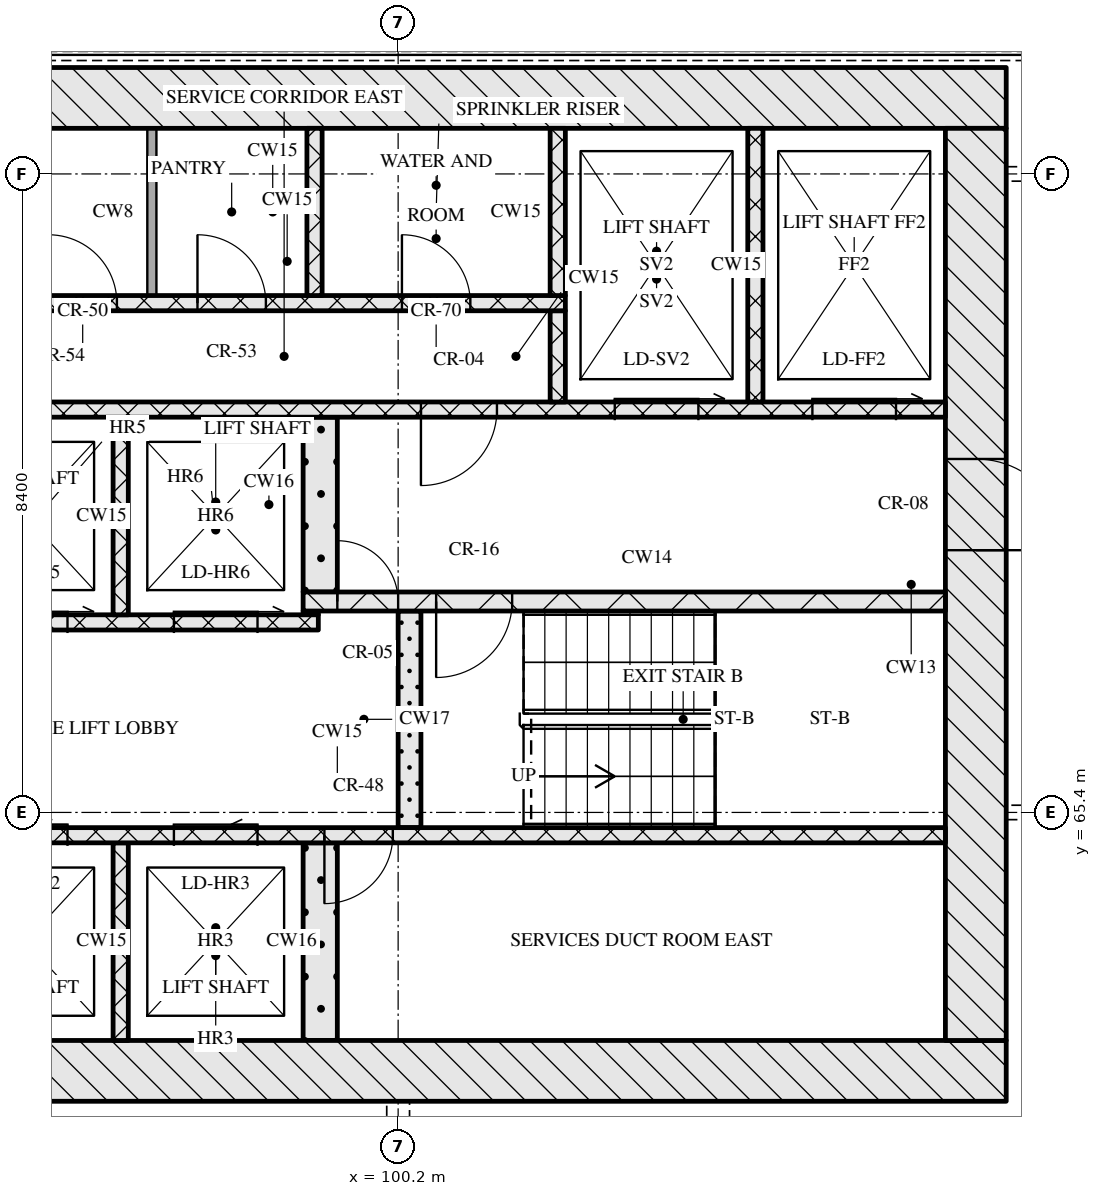
"""IFC4 building model, lengths in metres.
Left out: names, types, materials, properties, quantities, classifications, styles, units other than length and angle.
Written with IfcOpenShell. Run it as: python <this file> out.ifc"""

import sys

from ifc_helpers import new_model, si_unit, direction, frame, frame_2d, origin, place, context, subcontext, project, spatial, rectangle, extrude, element, fill, save


model = new_model("IFC4")
c1 = context("Model", 3, precision=1e-05, world=origin(), true_north=direction((0.0, 1.0)))
c2 = subcontext(c1, "Body", "Model", "MODEL_VIEW")
j1 = project(units=[si_unit("LENGTHUNIT", "METRE"), si_unit("PLANEANGLEUNIT", "RADIAN")], contexts=[c1])
p1 = place(None, origin())
s1 = spatial("IfcSite", under=j1, at=p1, CompositionType="ELEMENT")
p2 = place(p1, origin())
s2 = spatial("IfcBuilding", under=s1, at=p2, CompositionType="ELEMENT")
p3 = place(p2, frame((0.0, 0.0, 176.25)))
s3 = spatial("IfcBuildingStorey", under=s2, at=p3, CompositionType="ELEMENT", Elevation=176.25)
p4 = place(p3, frame((67.0, 62.0, 0.0), z_axis=(0.0, 0.0, 1.0), x_axis=(1.0, 0.0, 0.0)))
e1 = element("IfcWall", 1, at=p4, inside=s3, PredefinedType="SOLIDWALL", context=c2, shape_type="SweptSolid", body=[
    extrude(rectangle(XDim=41.2, YDim=0.8, at=frame_2d((20.6, 0.0))), origin(), (0.0, 0.0, 1.0), 3.32),
])
p5 = place(p4, frame((20.95, 0.0, 0.0)))
e2 = element("IfcOpeningElement", 2, at=p5, cuts=e1, PredefinedType="OPENING", context=c2, shape_type="SweptSolid", body=[
    extrude(rectangle(XDim=1.8, YDim=2.1, at=frame_2d((0.9, 1.05))), frame((0.0, 0.41, 0.0), z_axis=(0.0, -1.0, 0.0), x_axis=(1.0, 0.0, 0.0)), (0.0, 0.0, 1.0), 0.82),
])
p6 = place(p3, frame((67.0, 74.8, 0.0), z_axis=(0.0, 0.0, 1.0), x_axis=(1.0, 0.0, 0.0)))
e3 = element("IfcWall", 3, at=p6, inside=s3, PredefinedType="SOLIDWALL", context=c2, shape_type="SweptSolid", body=[
    extrude(rectangle(XDim=41.2, YDim=0.8, at=frame_2d((20.6, 0.0))), origin(), (0.0, 0.0, 1.0), 3.32),
])
p7 = place(p3, frame((107.8, 62.4, 0.0), z_axis=(0.0, 0.0, 1.0), x_axis=(0.0, 1.0, 0.0)))
e4 = element("IfcWall", 4, at=p7, inside=s3, PredefinedType="SOLIDWALL", context=c2, shape_type="SweptSolid", body=[
    extrude(rectangle(XDim=12.0, YDim=0.8, at=frame_2d((6.0, 0.0))), origin(), (0.0, 0.0, 1.0), 3.32),
])
p8 = place(p7, frame((6.45, 0.0, 0.0)))
e5 = element("IfcOpeningElement", 5, at=p8, cuts=e4, PredefinedType="OPENING", context=c2, shape_type="SweptSolid", body=[
    extrude(rectangle(XDim=1.2, YDim=2.1, at=frame_2d((0.6, 1.05))), frame((0.0, 0.41, 0.0), z_axis=(0.0, -1.0, 0.0), x_axis=(1.0, 0.0, 0.0)), (0.0, 0.0, 1.0), 0.82),
])
p9 = place(p3, frame((96.55, 62.4, 0.0), z_axis=(0.0, 0.0, 1.0), x_axis=(0.0, 1.0, 0.0)))
e6 = element("IfcWall", 6, at=p9, inside=s3, PredefinedType="SOLIDWALL", context=c2, shape_type="SweptSolid", body=[
    extrude(rectangle(XDim=2.6, YDim=0.2, at=frame_2d((1.3, 0.0))), origin(), (0.0, 0.0, 1.0), 3.32),
])
p10 = place(p3, frame((99.175, 62.4, 0.0), z_axis=(0.0, 0.0, 1.0), x_axis=(0.0, 1.0, 0.0)))
e7 = element("IfcWall", 7, at=p10, inside=s3, PredefinedType="SOLIDWALL", context=c2, shape_type="SweptSolid", body=[
    extrude(rectangle(XDim=2.6, YDim=0.45, at=frame_2d((1.3, 0.0))), origin(), (0.0, 0.0, 1.0), 3.32),
])
p11 = place(p3, frame((91.4, 65.1, 0.0), z_axis=(0.0, 0.0, 1.0), x_axis=(1.0, 0.0, 0.0)))
e8 = element("IfcWall", 8, at=p11, inside=s3, PredefinedType="SOLIDWALL", context=c2, shape_type="SweptSolid", body=[
    extrude(rectangle(XDim=16.0, YDim=0.2, at=frame_2d((8.0, 0.0))), origin(), (0.0, 0.0, 1.0), 3.32),
])
p12 = place(p11, frame((0.85, 0.0, 0.0)))
e9 = element("IfcOpeningElement", 9, at=p12, cuts=e8, PredefinedType="OPENING", context=c2, shape_type="SweptSolid", body=[
    extrude(rectangle(XDim=1.1, YDim=2.1, at=frame_2d((0.55, 1.05))), frame((0.0, 0.11, 0.0), z_axis=(0.0, -1.0, 0.0), x_axis=(1.0, 0.0, 0.0)), (0.0, 0.0, 1.0), 0.22),
])
p13 = place(p11, frame((3.35, 0.0, 0.0)))
e10 = element("IfcOpeningElement", 10, at=p13, cuts=e8, PredefinedType="OPENING", context=c2, shape_type="SweptSolid", body=[
    extrude(rectangle(XDim=1.1, YDim=2.1, at=frame_2d((0.55, 1.05))), frame((0.0, 0.11, 0.0), z_axis=(0.0, -1.0, 0.0), x_axis=(1.0, 0.0, 0.0)), (0.0, 0.0, 1.0), 0.22),
])
p14 = place(p11, frame((5.85, 0.0, 0.0)))
e11 = element("IfcOpeningElement", 11, at=p14, cuts=e8, PredefinedType="OPENING", context=c2, shape_type="SweptSolid", body=[
    extrude(rectangle(XDim=1.1, YDim=2.1, at=frame_2d((0.55, 1.05))), frame((0.0, 0.11, 0.0), z_axis=(0.0, -1.0, 0.0), x_axis=(1.0, 0.0, 0.0)), (0.0, 0.0, 1.0), 0.22),
])
p15 = place(p11, frame((7.83, 0.0, 0.0)))
e12 = element("IfcOpeningElement", 12, at=p15, cuts=e8, PredefinedType="OPENING", context=c2, shape_type="SweptSolid", body=[
    extrude(rectangle(XDim=0.9, YDim=2.1, at=frame_2d((0.45, 1.05))), frame((0.0, 0.11, 0.0), z_axis=(0.0, -1.0, 0.0), x_axis=(1.0, 0.0, 0.0)), (0.0, 0.0, 1.0), 0.22),
])
p16 = place(p3, frame((100.35, 65.2, 0.0), z_axis=(0.0, 0.0, 1.0), x_axis=(0.0, 1.0, 0.0)))
e13 = element("IfcWall", 13, at=p16, inside=s3, PredefinedType="SOLIDWALL", context=c2, shape_type="SweptSolid", body=[
    extrude(rectangle(XDim=2.85, YDim=0.3, at=frame_2d((1.425, 0.0))), origin(), (0.0, 0.0, 1.0), 3.32),
])
p17 = place(p3, frame((76.05, 67.9, 0.0), z_axis=(0.0, 0.0, 1.0), x_axis=(1.0, 0.0, 0.0)))
e14 = element("IfcWall", 14, at=p17, inside=s3, PredefinedType="SOLIDWALL", context=c2, shape_type="SweptSolid", body=[
    extrude(rectangle(XDim=23.1, YDim=0.2, at=frame_2d((11.55, 0.0))), origin(), (0.0, 0.0, 1.0), 3.32),
])
p18 = place(p17, frame((1.35, 0.0, 0.0)))
e15 = element("IfcOpeningElement", 15, at=p18, cuts=e14, PredefinedType="OPENING", context=c2, shape_type="SweptSolid", body=[
    extrude(rectangle(XDim=0.9, YDim=2.1, at=frame_2d((0.45, 1.05))), frame((0.0, 0.11, 0.0), z_axis=(0.0, -1.0, 0.0), x_axis=(1.0, 0.0, 0.0)), (0.0, 0.0, 1.0), 0.22),
])
p19 = place(p17, frame((5.06, 0.0, 0.0)))
e16 = element("IfcOpeningElement", 16, at=p19, cuts=e14, PredefinedType="OPENING", context=c2, shape_type="SweptSolid", body=[
    extrude(rectangle(XDim=0.9, YDim=2.1, at=frame_2d((0.45, 1.05))), frame((0.0, 0.11, 0.0), z_axis=(0.0, -1.0, 0.0), x_axis=(1.0, 0.0, 0.0)), (0.0, 0.0, 1.0), 0.22),
])
p20 = place(p17, frame((8.45, 0.0, 0.0)))
e17 = element("IfcOpeningElement", 17, at=p20, cuts=e14, PredefinedType="OPENING", context=c2, shape_type="SweptSolid", body=[
    extrude(rectangle(XDim=0.9, YDim=2.1, at=frame_2d((0.45, 1.05))), frame((0.0, 0.11, 0.0), z_axis=(0.0, -1.0, 0.0), x_axis=(1.0, 0.0, 0.0)), (0.0, 0.0, 1.0), 0.22),
])
p21 = place(p17, frame((10.91, 0.0, 0.0)))
e18 = element("IfcOpeningElement", 18, at=p21, cuts=e14, PredefinedType="OPENING", context=c2, shape_type="SweptSolid", body=[
    extrude(rectangle(XDim=0.9, YDim=2.1, at=frame_2d((0.45, 1.05))), frame((0.0, 0.11, 0.0), z_axis=(0.0, -1.0, 0.0), x_axis=(1.0, 0.0, 0.0)), (0.0, 0.0, 1.0), 0.22),
])
p22 = place(p17, frame((13.55, 0.0, 0.0)))
e19 = element("IfcOpeningElement", 19, at=p22, cuts=e14, PredefinedType="OPENING", context=c2, shape_type="SweptSolid", body=[
    extrude(rectangle(XDim=1.0, YDim=2.1, at=frame_2d((0.5, 1.05))), frame((0.0, 0.11, 0.0), z_axis=(0.0, -1.0, 0.0), x_axis=(1.0, 0.0, 0.0)), (0.0, 0.0, 1.0), 0.22),
])
p23 = place(p17, frame((16.2, 0.0, 0.0)))
e20 = element("IfcOpeningElement", 20, at=p23, cuts=e14, PredefinedType="OPENING", context=c2, shape_type="SweptSolid", body=[
    extrude(rectangle(XDim=1.1, YDim=2.1, at=frame_2d((0.55, 1.05))), frame((0.0, 0.11, 0.0), z_axis=(0.0, -1.0, 0.0), x_axis=(1.0, 0.0, 0.0)), (0.0, 0.0, 1.0), 0.22),
])
p24 = place(p17, frame((18.7, 0.0, 0.0)))
e21 = element("IfcOpeningElement", 21, at=p24, cuts=e14, PredefinedType="OPENING", context=c2, shape_type="SweptSolid", body=[
    extrude(rectangle(XDim=1.1, YDim=2.1, at=frame_2d((0.55, 1.05))), frame((0.0, 0.11, 0.0), z_axis=(0.0, -1.0, 0.0), x_axis=(1.0, 0.0, 0.0)), (0.0, 0.0, 1.0), 0.22),
])
p25 = place(p17, frame((21.2, 0.0, 0.0)))
e22 = element("IfcOpeningElement", 22, at=p25, cuts=e14, PredefinedType="OPENING", context=c2, shape_type="SweptSolid", body=[
    extrude(rectangle(XDim=1.1, YDim=2.1, at=frame_2d((0.55, 1.05))), frame((0.0, 0.11, 0.0), z_axis=(0.0, -1.0, 0.0), x_axis=(1.0, 0.0, 0.0)), (0.0, 0.0, 1.0), 0.22),
])
p26 = place(p3, frame((96.55, 68.0, 0.0), z_axis=(0.0, 0.0, 1.0), x_axis=(0.0, 1.0, 0.0)))
e23 = element("IfcWall", 23, at=p26, inside=s3, PredefinedType="SOLIDWALL", context=c2, shape_type="SweptSolid", body=[
    extrude(rectangle(XDim=2.6, YDim=0.2, at=frame_2d((1.3, 0.0))), origin(), (0.0, 0.0, 1.0), 3.32),
])
p27 = place(p3, frame((98.95, 68.025, 0.0), z_axis=(0.0, 0.0, 1.0), x_axis=(1.0, 0.0, 0.0)))
e24 = element("IfcWall", 24, at=p27, inside=s3, PredefinedType="SOLIDWALL", context=c2, shape_type="SweptSolid", body=[
    extrude(rectangle(XDim=0.2, YDim=0.05, at=frame_2d((0.1, 0.0))), origin(), (0.0, 0.0, 1.0), 3.32),
])
p28 = place(p3, frame((98.95, 68.175, 0.0), z_axis=(0.0, 0.0, 1.0), x_axis=(1.0, 0.0, 0.0)))
e25 = element("IfcWall", 25, at=p28, inside=s3, PredefinedType="SOLIDWALL", context=c2, shape_type="SweptSolid", body=[
    extrude(rectangle(XDim=8.45, YDim=0.25, at=frame_2d((4.225, 0.0))), origin(), (0.0, 0.0, 1.0), 3.32),
])
p29 = place(p28, frame((0.45, 0.0, 0.0)))
e26 = element("IfcOpeningElement", 26, at=p29, cuts=e25, PredefinedType="OPENING", context=c2, shape_type="SweptSolid", body=[
    extrude(rectangle(XDim=0.8, YDim=2.1, at=frame_2d((0.4, 1.05))), frame((0.0, 0.135, 0.0), z_axis=(0.0, -1.0, 0.0), x_axis=(1.0, 0.0, 0.0)), (0.0, 0.0, 1.0), 0.27),
])
p30 = place(p28, frame((1.75, 0.0, 0.0)))
e27 = element("IfcOpeningElement", 27, at=p30, cuts=e25, PredefinedType="OPENING", context=c2, shape_type="SweptSolid", body=[
    extrude(rectangle(XDim=1.0, YDim=2.1, at=frame_2d((0.5, 1.05))), frame((0.0, 0.135, 0.0), z_axis=(0.0, -1.0, 0.0), x_axis=(1.0, 0.0, 0.0)), (0.0, 0.0, 1.0), 0.27),
])
p31 = place(p3, frame((99.175, 68.3, 0.0), z_axis=(0.0, 0.0, 1.0), x_axis=(0.0, 1.0, 0.0)))
e28 = element("IfcWall", 28, at=p31, inside=s3, PredefinedType="SOLIDWALL", context=c2, shape_type="SweptSolid", body=[
    extrude(rectangle(XDim=2.3, YDim=0.45, at=frame_2d((1.15, 0.0))), origin(), (0.0, 0.0, 1.0), 3.32),
])
p32 = place(p3, frame((67.8, 70.7, 0.0), z_axis=(0.0, 0.0, 1.0), x_axis=(1.0, 0.0, 0.0)))
e29 = element("IfcWall", 29, at=p32, inside=s3, PredefinedType="SOLIDWALL", context=c2, shape_type="SweptSolid", body=[
    extrude(rectangle(XDim=39.6, YDim=0.2, at=frame_2d((19.8, 0.0))), origin(), (0.0, 0.0, 1.0), 3.32),
])
p33 = place(p32, frame((0.65, 0.0, 0.0)))
e30 = element("IfcOpeningElement", 30, at=p33, cuts=e29, PredefinedType="OPENING", context=c2, shape_type="SweptSolid", body=[
    extrude(rectangle(XDim=1.1, YDim=2.1, at=frame_2d((0.55, 1.05))), frame((0.0, 0.11, 0.0), z_axis=(0.0, -1.0, 0.0), x_axis=(1.0, 0.0, 0.0)), (0.0, 0.0, 1.0), 0.22),
])
p34 = place(p32, frame((3.25, 0.0, 0.0)))
e31 = element("IfcOpeningElement", 31, at=p34, cuts=e29, PredefinedType="OPENING", context=c2, shape_type="SweptSolid", body=[
    extrude(rectangle(XDim=1.1, YDim=2.1, at=frame_2d((0.55, 1.05))), frame((0.0, 0.11, 0.0), z_axis=(0.0, -1.0, 0.0), x_axis=(1.0, 0.0, 0.0)), (0.0, 0.0, 1.0), 0.22),
])
p35 = place(p32, frame((5.9, 0.0, 0.0)))
e32 = element("IfcOpeningElement", 32, at=p35, cuts=e29, PredefinedType="OPENING", context=c2, shape_type="SweptSolid", body=[
    extrude(rectangle(XDim=1.0, YDim=2.1, at=frame_2d((0.5, 1.05))), frame((0.0, 0.11, 0.0), z_axis=(0.0, -1.0, 0.0), x_axis=(1.0, 0.0, 0.0)), (0.0, 0.0, 1.0), 0.22),
])
p36 = place(p32, frame((21.7, 0.0, 0.0)))
e33 = element("IfcOpeningElement", 33, at=p36, cuts=e29, PredefinedType="OPENING", context=c2, shape_type="SweptSolid", body=[
    extrude(rectangle(XDim=1.0, YDim=2.1, at=frame_2d((0.5, 1.05))), frame((0.0, 0.11, 0.0), z_axis=(0.0, -1.0, 0.0), x_axis=(1.0, 0.0, 0.0)), (0.0, 0.0, 1.0), 0.22),
])
p37 = place(p32, frame((32.7, 0.0, 0.0)))
e34 = element("IfcOpeningElement", 34, at=p37, cuts=e29, PredefinedType="OPENING", context=c2, shape_type="SweptSolid", body=[
    extrude(rectangle(XDim=1.0, YDim=2.1, at=frame_2d((0.5, 1.05))), frame((0.0, 0.11, 0.0), z_axis=(0.0, -1.0, 0.0), x_axis=(1.0, 0.0, 0.0)), (0.0, 0.0, 1.0), 0.22),
])
p38 = place(p32, frame((35.25, 0.0, 0.0)))
e35 = element("IfcOpeningElement", 35, at=p38, cuts=e29, PredefinedType="OPENING", context=c2, shape_type="SweptSolid", body=[
    extrude(rectangle(XDim=1.1, YDim=2.1, at=frame_2d((0.55, 1.05))), frame((0.0, 0.11, 0.0), z_axis=(0.0, -1.0, 0.0), x_axis=(1.0, 0.0, 0.0)), (0.0, 0.0, 1.0), 0.22),
])
p39 = place(p32, frame((37.85, 0.0, 0.0)))
e36 = element("IfcOpeningElement", 36, at=p39, cuts=e29, PredefinedType="OPENING", context=c2, shape_type="SweptSolid", body=[
    extrude(rectangle(XDim=1.1, YDim=2.1, at=frame_2d((0.55, 1.05))), frame((0.0, 0.11, 0.0), z_axis=(0.0, -1.0, 0.0), x_axis=(1.0, 0.0, 0.0)), (0.0, 0.0, 1.0), 0.22),
])
p40 = place(p3, frame((102.3, 70.8, 0.0), z_axis=(0.0, 0.0, 1.0), x_axis=(0.0, 1.0, 0.0)))
e37 = element("IfcWall", 37, at=p40, inside=s3, PredefinedType="SOLIDWALL", context=c2, shape_type="SweptSolid", body=[
    extrude(rectangle(XDim=1.2, YDim=0.2, at=frame_2d((0.6, 0.0))), origin(), (0.0, 0.0, 1.0), 3.32),
])
p41 = place(p3, frame((104.9, 70.8, 0.0), z_axis=(0.0, 0.0, 1.0), x_axis=(0.0, 1.0, 0.0)))
e38 = element("IfcWall", 38, at=p41, inside=s3, PredefinedType="SOLIDWALL", context=c2, shape_type="SweptSolid", body=[
    extrude(rectangle(XDim=3.6, YDim=0.2, at=frame_2d((1.8, 0.0))), origin(), (0.0, 0.0, 1.0), 3.32),
])
p42 = place(p3, frame((95.08, 72.1, 0.0), z_axis=(0.0, 0.0, 1.0), x_axis=(1.0, 0.0, 0.0)))
e39 = element("IfcWall", 39, at=p42, inside=s3, PredefinedType="SOLIDWALL", context=c2, shape_type="SweptSolid", body=[
    extrude(rectangle(XDim=7.32, YDim=0.2, at=frame_2d((3.66, 0.0))), origin(), (0.0, 0.0, 1.0), 3.32),
])
p43 = place(p42, frame((0.52, 0.0, 0.0)))
e40 = element("IfcOpeningElement", 40, at=p43, cuts=e39, PredefinedType="OPENING", context=c2, shape_type="SweptSolid", body=[
    extrude(rectangle(XDim=0.9, YDim=2.1, at=frame_2d((0.45, 1.05))), frame((0.0, 0.11, 0.0), z_axis=(0.0, -1.0, 0.0), x_axis=(1.0, 0.0, 0.0)), (0.0, 0.0, 1.0), 0.22),
])
p44 = place(p42, frame((2.48, 0.0, 0.0)))
e41 = element("IfcOpeningElement", 41, at=p44, cuts=e39, PredefinedType="OPENING", context=c2, shape_type="SweptSolid", body=[
    extrude(rectangle(XDim=0.9, YDim=2.1, at=frame_2d((0.45, 1.05))), frame((0.0, 0.11, 0.0), z_axis=(0.0, -1.0, 0.0), x_axis=(1.0, 0.0, 0.0)), (0.0, 0.0, 1.0), 0.22),
])
p45 = place(p42, frame((5.17, 0.0, 0.0)))
e42 = element("IfcOpeningElement", 42, at=p45, cuts=e39, PredefinedType="OPENING", context=c2, shape_type="SweptSolid", body=[
    extrude(rectangle(XDim=0.9, YDim=2.1, at=frame_2d((0.45, 1.05))), frame((0.0, 0.11, 0.0), z_axis=(0.0, -1.0, 0.0), x_axis=(1.0, 0.0, 0.0)), (0.0, 0.0, 1.0), 0.22),
])
p46 = place(p3, frame((96.96, 72.2, 0.0), z_axis=(0.0, 0.0, 1.0), x_axis=(0.0, 1.0, 0.0)))
e43 = element("IfcWall", 43, at=p46, inside=s3, PredefinedType="PARTITIONING", context=c2, shape_type="SweptSolid", body=[
    extrude(rectangle(XDim=2.2, YDim=0.12, at=frame_2d((1.1, 0.0))), origin(), (0.0, 0.0, 1.0), 3.32),
])
for number, where, z_axis, x_axis in (
    (44, (99.1, 72.2, 0.0), (0.0, 0.0, 1.0), (0.0, 1.0, 0.0)),
    (45, (102.3, 72.2, 0.0), (0.0, 0.0, 1.0), (0.0, 1.0, 0.0)),
):
    element("IfcWall", number, at=place(p3, frame(where, z_axis=z_axis, x_axis=x_axis)), inside=s3, PredefinedType="SOLIDWALL", context=c2, shape_type="SweptSolid", body=[
        extrude(rectangle(XDim=2.2, YDim=0.2, at=frame_2d((1.1, 0.0))), origin(), (0.0, 0.0, 1.0), 3.32),
    ])
p47 = place(p13, origin())
e46 = element("IfcDoor", 46, at=p47, inside=s3, OperationType="SLIDING_TO_LEFT", PredefinedType="DOOR", context=c2, shape_type="SweptSolid", body=[
    extrude(rectangle(XDim=1.1, YDim=2.1, at=frame_2d((0.55, 1.05))), frame((0.0, 0.025, 0.0), z_axis=(0.0, -1.0, 0.0), x_axis=(1.0, 0.0, 0.0)), (0.0, 0.0, 1.0), 0.05),
])
fill(e10, e46)
p48 = place(p14, origin())
e47 = element("IfcDoor", 47, at=p48, inside=s3, OperationType="SLIDING_TO_LEFT", PredefinedType="DOOR", context=c2, shape_type="SweptSolid", body=[
    extrude(rectangle(XDim=1.1, YDim=2.1, at=frame_2d((0.55, 1.05))), frame((0.0, 0.025, 0.0), z_axis=(0.0, -1.0, 0.0), x_axis=(1.0, 0.0, 0.0)), (0.0, 0.0, 1.0), 0.05),
])
fill(e11, e47)
p49 = place(p15, origin())
e48 = element("IfcDoor", 48, at=p49, inside=s3, OperationType="SINGLE_SWING_RIGHT", PredefinedType="DOOR", context=c2, shape_type="SweptSolid", body=[
    extrude(rectangle(XDim=0.9, YDim=2.1, at=frame_2d((0.45, 1.05))), frame((0.0, 0.025, 0.0), z_axis=(0.0, -1.0, 0.0), x_axis=(1.0, 0.0, 0.0)), (0.0, 0.0, 1.0), 0.05),
])
fill(e12, e48)
p50 = place(p24, origin())
e49 = element("IfcDoor", 49, at=p50, inside=s3, OperationType="SLIDING_TO_RIGHT", PredefinedType="DOOR", context=c2, shape_type="SweptSolid", body=[
    extrude(rectangle(XDim=1.1, YDim=2.1, at=frame_2d((0.55, 1.05))), frame((0.0, 0.025, 0.0), z_axis=(0.0, -1.0, 0.0), x_axis=(1.0, 0.0, 0.0)), (0.0, 0.0, 1.0), 0.05),
])
fill(e21, e49)
p51 = place(p25, origin())
e50 = element("IfcDoor", 50, at=p51, inside=s3, OperationType="SLIDING_TO_RIGHT", PredefinedType="DOOR", context=c2, shape_type="SweptSolid", body=[
    extrude(rectangle(XDim=1.1, YDim=2.1, at=frame_2d((0.55, 1.05))), frame((0.0, 0.025, 0.0), z_axis=(0.0, -1.0, 0.0), x_axis=(1.0, 0.0, 0.0)), (0.0, 0.0, 1.0), 0.05),
])
fill(e22, e50)
p52 = place(p29, origin())
e51 = element("IfcDoor", 51, at=p52, inside=s3, OperationType="SINGLE_SWING_LEFT", PredefinedType="DOOR", context=c2, shape_type="SweptSolid", body=[
    extrude(rectangle(XDim=0.8, YDim=2.1, at=frame_2d((0.4, 1.05))), frame((0.0, 0.025, 0.0), z_axis=(0.0, -1.0, 0.0), x_axis=(1.0, 0.0, 0.0)), (0.0, 0.0, 1.0), 0.05),
])
fill(e26, e51)
p53 = place(p30, origin())
e52 = element("IfcDoor", 52, at=p53, inside=s3, OperationType="SINGLE_SWING_RIGHT", PredefinedType="DOOR", context=c2, shape_type="SweptSolid", body=[
    extrude(rectangle(XDim=1.0, YDim=2.1, at=frame_2d((0.5, 1.05))), frame((0.0, 0.025, 0.0), z_axis=(0.0, -1.0, 0.0), x_axis=(1.0, 0.0, 0.0)), (0.0, 0.0, 1.0), 0.05),
])
fill(e27, e52)
p54 = place(p8, origin())
e53 = element("IfcDoor", 53, at=p54, inside=s3, OperationType="SINGLE_SWING_RIGHT", PredefinedType="DOOR", context=c2, shape_type="SweptSolid", body=[
    extrude(rectangle(XDim=1.2, YDim=2.1, at=frame_2d((0.6, 1.05))), frame((0.0, 0.025, 0.0), z_axis=(0.0, -1.0, 0.0), x_axis=(1.0, 0.0, 0.0)), (0.0, 0.0, 1.0), 0.05),
])
fill(e5, e53)
p55 = place(p37, origin())
e54 = element("IfcDoor", 54, at=p55, inside=s3, OperationType="SINGLE_SWING_RIGHT", PredefinedType="DOOR", context=c2, shape_type="SweptSolid", body=[
    extrude(rectangle(XDim=1.0, YDim=2.1, at=frame_2d((0.5, 1.05))), frame((0.0, 0.025, 0.0), z_axis=(0.0, -1.0, 0.0), x_axis=(1.0, 0.0, 0.0)), (0.0, 0.0, 1.0), 0.05),
])
fill(e34, e54)
p56 = place(p38, origin())
e55 = element("IfcDoor", 55, at=p56, inside=s3, OperationType="SLIDING_TO_RIGHT", PredefinedType="DOOR", context=c2, shape_type="SweptSolid", body=[
    extrude(rectangle(XDim=1.1, YDim=2.1, at=frame_2d((0.55, 1.05))), frame((0.0, 0.025, 0.0), z_axis=(0.0, -1.0, 0.0), x_axis=(1.0, 0.0, 0.0)), (0.0, 0.0, 1.0), 0.05),
])
fill(e35, e55)
p57 = place(p39, origin())
e56 = element("IfcDoor", 56, at=p57, inside=s3, OperationType="SLIDING_TO_RIGHT", PredefinedType="DOOR", context=c2, shape_type="SweptSolid", body=[
    extrude(rectangle(XDim=1.1, YDim=2.1, at=frame_2d((0.55, 1.05))), frame((0.0, 0.025, 0.0), z_axis=(0.0, -1.0, 0.0), x_axis=(1.0, 0.0, 0.0)), (0.0, 0.0, 1.0), 0.05),
])
fill(e36, e56)
p58 = place(p43, origin())
e57 = element("IfcDoor", 57, at=p58, inside=s3, OperationType="SINGLE_SWING_LEFT", PredefinedType="DOOR", context=c2, shape_type="SweptSolid", body=[
    extrude(rectangle(XDim=0.9, YDim=2.1, at=frame_2d((0.45, 1.05))), frame((0.0, 0.025, 0.0), z_axis=(0.0, -1.0, 0.0), x_axis=(1.0, 0.0, 0.0)), (0.0, 0.0, 1.0), 0.05),
])
fill(e40, e57)
p59 = place(p44, origin())
e58 = element("IfcDoor", 58, at=p59, inside=s3, OperationType="SINGLE_SWING_LEFT", PredefinedType="DOOR", context=c2, shape_type="SweptSolid", body=[
    extrude(rectangle(XDim=0.9, YDim=2.1, at=frame_2d((0.45, 1.05))), frame((0.0, 0.025, 0.0), z_axis=(0.0, -1.0, 0.0), x_axis=(1.0, 0.0, 0.0)), (0.0, 0.0, 1.0), 0.05),
])
fill(e41, e58)
p60 = place(p45, origin())
e59 = element("IfcDoor", 59, at=p60, inside=s3, OperationType="SINGLE_SWING_LEFT", PredefinedType="DOOR", context=c2, shape_type="SweptSolid", body=[
    extrude(rectangle(XDim=0.9, YDim=2.1, at=frame_2d((0.45, 1.05))), frame((0.0, 0.025, 0.0), z_axis=(0.0, -1.0, 0.0), x_axis=(1.0, 0.0, 0.0)), (0.0, 0.0, 1.0), 0.05),
])
fill(e42, e59)
save(model, sys.argv[1])
